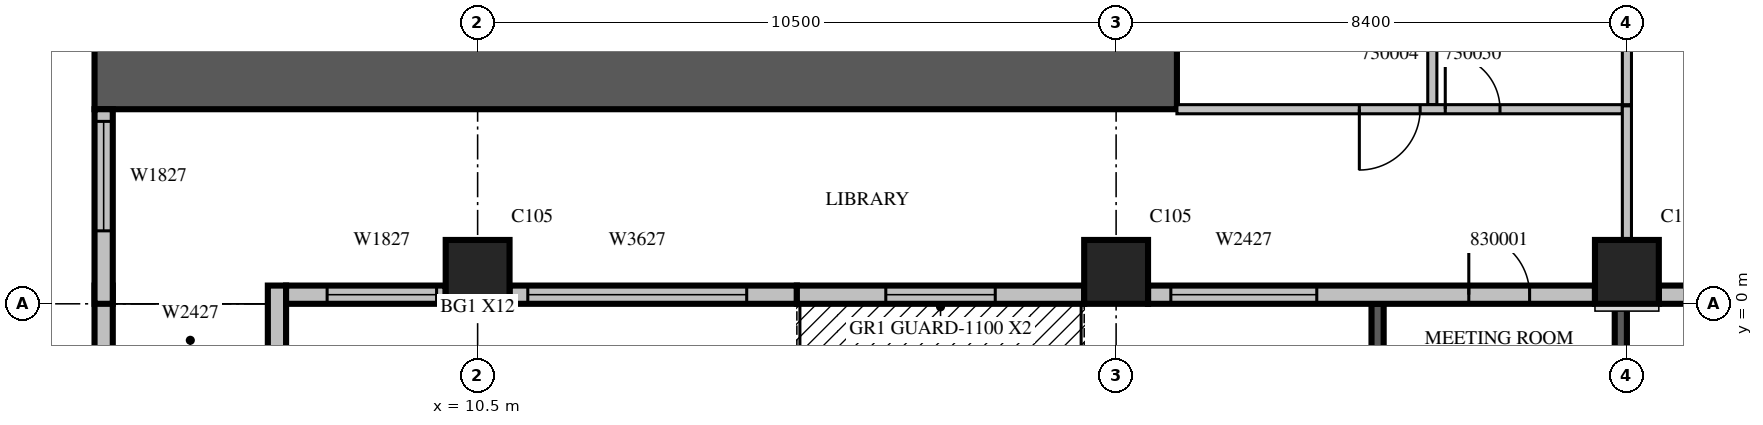
"""IFC4 building model, lengths in metres.
Left out: names, types, materials, properties, quantities, classifications, styles, units other than length and angle.
Written with IfcOpenShell. Run it as: python <this file> out.ifc"""

import sys

from ifc_helpers import new_model, si_unit, direction, frame, frame_2d, origin, origin_2d, place, context, subcontext, project, spatial, rectangle, extrude, source, transform, mapped, element, fill, save


model = new_model("IFC4")
c1 = context("Model", 3, precision=1e-05, world=origin(), true_north=direction((0.0, 1.0)))
c2 = subcontext(c1, "Body", "Model", "MODEL_VIEW")
j1 = project(units=[si_unit("LENGTHUNIT", "METRE"), si_unit("PLANEANGLEUNIT", "RADIAN")], contexts=[c1])
p1 = place(None, origin())
s1 = spatial("IfcSite", under=j1, at=p1, CompositionType="ELEMENT")
p2 = place(p1, origin())
s2 = spatial("IfcBuilding", under=s1, at=p2, CompositionType="ELEMENT")
p3 = place(p2, frame((0.0, 0.0, 137.1)))
s3 = spatial("IfcBuildingStorey", under=s2, at=p3, CompositionType="ELEMENT", Elevation=137.1)
m1 = source(origin(), c2, "Body", "SweptSolid", [
    extrude(rectangle(XDim=1.05, YDim=1.05, at=origin_2d()), origin(), (0.0, 0.0, 1.0), 4.2),
])
for number, where, z_axis, x_axis in (
    (1, (10.5, 0.525, 0.0), (0.0, 0.0, 1.0), (1.0, 0.0, 0.0)),
    (2, (21.0, 0.525, 0.0), (0.0, 0.0, 1.0), (1.0, 0.0, 0.0)),
    (3, (29.4, 0.525, 0.0), (0.0, 0.0, 1.0), (1.0, 0.0, 0.0)),
):
    element("IfcColumn", number, at=place(p3, frame(where, z_axis=z_axis, x_axis=x_axis)), inside=s3, PredefinedType="COLUMN", context=c2, shape_type="MappedRepresentation", body=[
        mapped(m1, transform((0.0, 0.0, 0.0), scale=1.0)),
    ])
m2 = source(origin(), c2, "Body", "SweptSolid", [
    extrude(rectangle(XDim=17.8, YDim=1.0, at=frame_2d((8.9, 0.0))), origin(), (0.0, 0.0, 1.0), 4.2),
])
p4 = place(p3, frame((4.2, 3.7, 0.0), z_axis=(0.0, 0.0, 1.0), x_axis=(1.0, 0.0, 0.0)))
e4 = element("IfcWall", 4, at=p4, inside=s3, PredefinedType="SHEAR", context=c2, shape_type="MappedRepresentation", body=[
    mapped(m2, transform((0.0, 0.0, 0.0), scale=1.0)),
])
m3 = source(origin(), c2, "Body", "SweptSolid", [
    extrude(rectangle(XDim=3.9, YDim=0.2, at=frame_2d((1.95, 0.0))), origin(), (0.0, 0.0, 1.0), 3.8),
])
p5 = place(p3, frame((25.3, 0.0, 0.0), z_axis=(0.0, 0.0, 1.0), x_axis=(0.0, -1.0, 0.0)))
e5 = element("IfcWall", 5, at=p5, inside=s3, PredefinedType="SOLIDWALL", context=c2, shape_type="MappedRepresentation", body=[
    mapped(m3, transform((0.0, 0.0, 0.0), scale=1.0)),
])
m4 = source(origin(), c2, "Body", "SweptSolid", [
    extrude(rectangle(XDim=2.4, YDim=2.7, at=frame_2d((1.2, 1.35))), frame((0.0, 0.11, 0.0), z_axis=(0.0, -1.0, 0.0), x_axis=(1.0, 0.0, 0.0)), (0.0, 0.0, 1.0), 0.22),
])
p6 = place(p5, frame((0.75, 0.0, 0.6)))
e6 = element("IfcOpeningElement", 6, at=p6, cuts=e5, PredefinedType="OPENING", context=c2, shape_type="MappedRepresentation", body=[
    mapped(m4, transform((0.0, 0.0, 0.0), scale=1.0)),
])
p7 = place(p3, frame((29.3, 0.0, 0.0), z_axis=(0.0, 0.0, 1.0), x_axis=(0.0, -1.0, 0.0)))
e7 = element("IfcWall", 7, at=p7, inside=s3, PredefinedType="SOLIDWALL", context=c2, shape_type="MappedRepresentation", body=[
    mapped(m3, transform((0.0, 0.0, 0.0), scale=1.0)),
])
p8 = place(p7, frame((0.75, 0.0, 0.6)))
e8 = element("IfcOpeningElement", 8, at=p8, cuts=e7, PredefinedType="OPENING", context=c2, shape_type="MappedRepresentation", body=[
    mapped(m4, transform((0.0, 0.0, 0.0), scale=1.0)),
])
m5 = source(origin(), c2, "Body", "SweptSolid", [
    extrude(rectangle(XDim=1.2, YDim=0.3, at=frame_2d((0.6, 0.0))), origin(), (0.0, 0.0, 1.0), 3.8),
])
for number, where, z_axis, x_axis in (
    (9, (4.35, 0.3, 0.0), (0.0, 0.0, 1.0), (0.0, -1.0, 0.0)),
    (10, (7.2, 0.3, 0.0), (0.0, 0.0, 1.0), (0.0, -1.0, 0.0)),
):
    element("IfcWall", number, at=place(p3, frame(where, z_axis=z_axis, x_axis=x_axis)), inside=s3, PredefinedType="STANDARD", context=c2, shape_type="MappedRepresentation", body=[
        mapped(m5, transform((0.0, 0.0, 0.0), scale=1.0)),
    ])
m6 = source(origin(), c2, "Body", "SweptSolid", [
    extrude(rectangle(XDim=2.625, YDim=0.3, at=frame_2d((1.312, 0.0))), origin(), (0.0, 0.0, 1.0), 3.8),
])
p9 = place(p3, frame((7.35, 0.15, 0.0), z_axis=(0.0, 0.0, 1.0), x_axis=(1.0, 0.0, 0.0)))
e11 = element("IfcWall", 11, at=p9, inside=s3, PredefinedType="STANDARD", context=c2, shape_type="MappedRepresentation", body=[
    mapped(m6, transform((0.0, 0.0, 0.0), scale=1.0)),
])
m7 = source(origin(), c2, "Body", "SweptSolid", [
    extrude(rectangle(XDim=1.8, YDim=2.7, at=frame_2d((0.9, 1.35))), frame((0.0, 0.16, 0.0), z_axis=(0.0, -1.0, 0.0), x_axis=(1.0, 0.0, 0.0)), (0.0, 0.0, 1.0), 0.32),
])
p10 = place(p9, frame((0.675, 0.0, 0.6)))
e12 = element("IfcOpeningElement", 12, at=p10, cuts=e11, PredefinedType="OPENING", context=c2, shape_type="MappedRepresentation", body=[
    mapped(m7, transform((0.0, 0.0, 0.0), scale=1.0)),
])
m8 = source(origin(), c2, "Body", "SweptSolid", [
    extrude(rectangle(XDim=4.725, YDim=0.3, at=frame_2d((2.362, 0.0))), origin(), (0.0, 0.0, 1.0), 3.8),
])
p11 = place(p3, frame((11.025, 0.15, 0.0), z_axis=(0.0, 0.0, 1.0), x_axis=(1.0, 0.0, 0.0)))
e13 = element("IfcWall", 13, at=p11, inside=s3, PredefinedType="STANDARD", context=c2, shape_type="MappedRepresentation", body=[
    mapped(m8, transform((0.0, 0.0, 0.0), scale=1.0)),
])
m9 = source(origin(), c2, "Body", "SweptSolid", [
    extrude(rectangle(XDim=3.6, YDim=2.7, at=frame_2d((1.8, 1.35))), frame((0.0, 0.16, 0.0), z_axis=(0.0, -1.0, 0.0), x_axis=(1.0, 0.0, 0.0)), (0.0, 0.0, 1.0), 0.32),
])
p12 = place(p11, frame((0.3, 0.0, 0.6)))
e14 = element("IfcOpeningElement", 14, at=p12, cuts=e13, PredefinedType="OPENING", context=c2, shape_type="MappedRepresentation", body=[
    mapped(m9, transform((0.0, 0.0, 0.0), scale=1.0)),
])
p13 = place(p3, frame((15.75, 0.15, 0.0), z_axis=(0.0, 0.0, 1.0), x_axis=(1.0, 0.0, 0.0)))
e15 = element("IfcWall", 15, at=p13, inside=s3, PredefinedType="STANDARD", context=c2, shape_type="MappedRepresentation", body=[
    mapped(m8, transform((0.0, 0.0, 0.0), scale=1.0)),
])
m10 = source(origin(), c2, "Body", "SweptSolid", [
    extrude(rectangle(XDim=1.8, YDim=2.4, at=frame_2d((0.9, 1.2))), frame((0.0, 0.16, 0.0), z_axis=(0.0, -1.0, 0.0), x_axis=(1.0, 0.0, 0.0)), (0.0, 0.0, 1.0), 0.32),
])
p14 = place(p13, frame((1.462, 0.0, 0.0)))
e16 = element("IfcOpeningElement", 16, at=p14, cuts=e15, PredefinedType="OPENING", context=c2, shape_type="MappedRepresentation", body=[
    mapped(m10, transform((0.0, 0.0, 0.0), scale=1.0)),
])
m11 = source(origin(), c2, "Body", "SweptSolid", [
    extrude(rectangle(XDim=7.35, YDim=0.3, at=frame_2d((3.675, 0.0))), origin(), (0.0, 0.0, 1.0), 3.8),
])
p15 = place(p3, frame((21.525, 0.15, 0.0), z_axis=(0.0, 0.0, 1.0), x_axis=(1.0, 0.0, 0.0)))
e17 = element("IfcWall", 17, at=p15, inside=s3, PredefinedType="STANDARD", context=c2, shape_type="MappedRepresentation", body=[
    mapped(m11, transform((0.0, 0.0, 0.0), scale=1.0)),
])
m12 = source(origin(), c2, "Body", "SweptSolid", [
    extrude(rectangle(XDim=2.4, YDim=2.7, at=frame_2d((1.2, 1.35))), frame((0.0, 0.16, 0.0), z_axis=(0.0, -1.0, 0.0), x_axis=(1.0, 0.0, 0.0)), (0.0, 0.0, 1.0), 0.32),
])
p16 = place(p15, frame((0.375, 0.0, 0.6)))
e18 = element("IfcOpeningElement", 18, at=p16, cuts=e17, PredefinedType="OPENING", context=c2, shape_type="MappedRepresentation", body=[
    mapped(m12, transform((0.0, 0.0, 0.0), scale=1.0)),
])
m13 = source(origin(), c2, "Body", "SweptSolid", [
    extrude(rectangle(XDim=1.0, YDim=2.1, at=frame_2d((0.5, 1.05))), frame((0.0, 0.16, 0.0), z_axis=(0.0, -1.0, 0.0), x_axis=(1.0, 0.0, 0.0)), (0.0, 0.0, 1.0), 0.32),
])
p17 = place(p15, frame((5.275, 0.0, 0.0)))
e19 = element("IfcOpeningElement", 19, at=p17, cuts=e17, PredefinedType="OPENING", context=c2, shape_type="MappedRepresentation", body=[
    mapped(m13, transform((0.0, 0.0, 0.0), scale=1.0)),
])
p18 = place(p3, frame((29.925, 0.15, 0.0), z_axis=(0.0, 0.0, 1.0), x_axis=(1.0, 0.0, 0.0)))
e20 = element("IfcWall", 20, at=p18, inside=s3, PredefinedType="STANDARD", context=c2, shape_type="MappedRepresentation", body=[
    mapped(m11, transform((0.0, 0.0, 0.0), scale=1.0)),
])
p19 = place(p18, frame((2.575, 0.0, 0.6)))
e21 = element("IfcOpeningElement", 21, at=p19, cuts=e20, PredefinedType="OPENING", context=c2, shape_type="MappedRepresentation", body=[
    mapped(m12, transform((0.0, 0.0, 0.0), scale=1.0)),
])
m14 = source(origin(), c2, "Body", "SweptSolid", [
    extrude(rectangle(XDim=3.2, YDim=0.3, at=frame_2d((1.6, 0.0))), origin(), (0.0, 0.0, 1.0), 3.8),
])
p20 = place(p3, frame((4.35, 3.2, 0.0), z_axis=(0.0, 0.0, 1.0), x_axis=(0.0, -1.0, 0.0)))
e22 = element("IfcWall", 22, at=p20, inside=s3, PredefinedType="STANDARD", context=c2, shape_type="MappedRepresentation", body=[
    mapped(m14, transform((0.0, 0.0, 0.0), scale=1.0)),
])
p21 = place(p20, frame((0.2, 0.0, 0.6)))
e23 = element("IfcOpeningElement", 23, at=p21, cuts=e22, PredefinedType="OPENING", context=c2, shape_type="MappedRepresentation", body=[
    mapped(m7, transform((0.0, 0.0, 0.0), scale=1.0)),
])
m15 = source(origin(), c2, "Body", "SweptSolid", [
    extrude(rectangle(XDim=11.425, YDim=0.15, at=frame_2d((5.713, 0.0))), origin(), (0.0, 0.0, 1.0), 3.8),
])
p22 = place(p3, frame((26.2, 14.7, 0.0), z_axis=(0.0, 0.0, 1.0), x_axis=(0.0, -1.0, 0.0)))
e24 = element("IfcWall", 24, at=p22, inside=s3, PredefinedType="PARTITIONING", context=c2, shape_type="MappedRepresentation", body=[
    mapped(m15, transform((0.0, 0.0, 0.0), scale=1.0)),
])
m16 = source(origin(), c2, "Body", "SweptSolid", [
    extrude(rectangle(XDim=0.9, YDim=2.1, at=frame_2d((0.45, 1.05))), frame((0.0, 0.085, 0.0), z_axis=(0.0, -1.0, 0.0), x_axis=(1.0, 0.0, 0.0)), (0.0, 0.0, 1.0), 0.17),
])
p23 = place(p22, frame((7.362, 0.0, 0.0)))
e25 = element("IfcOpeningElement", 25, at=p23, cuts=e24, PredefinedType="OPENING", context=c2, shape_type="MappedRepresentation", body=[
    mapped(m16, transform((0.0, 0.0, 0.0), scale=1.0)),
])
p24 = place(p22, frame((0.775, 0.0, 0.0)))
e26 = element("IfcOpeningElement", 26, at=p24, cuts=e24, PredefinedType="OPENING", context=c2, shape_type="MappedRepresentation", body=[
    mapped(m16, transform((0.0, 0.0, 0.0), scale=1.0)),
])
m17 = source(origin(), c2, "Body", "SweptSolid", [
    extrude(rectangle(XDim=6.701, YDim=0.15, at=frame_2d((3.35, 0.0))), origin(), (0.0, 0.0, 1.0), 3.8),
])
p25 = place(p3, frame((29.4, 3.275, 0.0), z_axis=(0.0, 0.0, 1.0), x_axis=(0.0, 1.0, 0.0)))
e27 = element("IfcWall", 27, at=p25, inside=s3, PredefinedType="PARTITIONING", context=c2, shape_type="MappedRepresentation", body=[
    mapped(m17, transform((0.0, 0.0, 0.0), scale=1.0)),
])
m18 = source(origin(), c2, "Body", "SweptSolid", [
    extrude(rectangle(XDim=7.325, YDim=0.15, at=frame_2d((3.663, 0.0))), origin(), (0.0, 0.0, 1.0), 3.8),
])
p26 = place(p3, frame((22.0, 3.2, 0.0), z_axis=(0.0, 0.0, 1.0), x_axis=(1.0, 0.0, 0.0)))
e28 = element("IfcWall", 28, at=p26, inside=s3, PredefinedType="PARTITIONING", context=c2, shape_type="MappedRepresentation", body=[
    mapped(m18, transform((0.0, 0.0, 0.0), scale=1.0)),
])
m19 = source(origin(), c2, "Body", "SweptSolid", [
    extrude(rectangle(XDim=1.0, YDim=2.1, at=frame_2d((0.5, 1.05))), frame((0.0, 0.085, 0.0), z_axis=(0.0, -1.0, 0.0), x_axis=(1.0, 0.0, 0.0)), (0.0, 0.0, 1.0), 0.17),
])
p27 = place(p26, frame((3.0, 0.0, 0.0)))
e29 = element("IfcOpeningElement", 29, at=p27, cuts=e28, PredefinedType="OPENING", context=c2, shape_type="MappedRepresentation", body=[
    mapped(m19, transform((0.0, 0.0, 0.0), scale=1.0)),
])
p28 = place(p26, frame((4.413, 0.0, 0.0)))
e30 = element("IfcOpeningElement", 30, at=p28, cuts=e28, PredefinedType="OPENING", context=c2, shape_type="MappedRepresentation", body=[
    mapped(m16, transform((0.0, 0.0, 0.0), scale=1.0)),
])
m20 = source(origin(), c2, "Body", "SweptSolid", [
    extrude(rectangle(XDim=2.206, YDim=0.15, at=frame_2d((1.103, 0.0))), origin(), (0.0, 0.0, 1.0), 3.8),
])
p29 = place(p3, frame((29.4, 1.049, 0.0), z_axis=(0.0, 0.0, 1.0), x_axis=(0.0, 1.0, 0.0)))
e31 = element("IfcWall", 31, at=p29, inside=s3, PredefinedType="PARTITIONING", context=c2, shape_type="MappedRepresentation", body=[
    mapped(m20, transform((0.0, 0.0, 0.0), scale=1.0)),
])
m21 = source(origin(), c2, "Body", "SweptSolid", [
    extrude(rectangle(XDim=1.8, YDim=2.7, at=frame_2d((0.9, 1.35))), frame((0.0, 0.03, 0.0), z_axis=(0.0, -1.0, 0.0), x_axis=(1.0, 0.0, 0.0)), (0.0, 0.0, 1.0), 0.06),
])
p30 = place(p10, origin())
e32 = element("IfcWindow", 32, at=p30, inside=s3, PartitioningType="SINGLE_PANEL", PredefinedType="WINDOW", context=c2, shape_type="MappedRepresentation", body=[
    mapped(m21, transform((0.0, 0.0, 0.0), scale=1.0)),
])
fill(e12, e32)
m22 = source(origin(), c2, "Body", "SweptSolid", [
    extrude(rectangle(XDim=3.6, YDim=2.7, at=frame_2d((1.8, 1.35))), frame((0.0, 0.03, 0.0), z_axis=(0.0, -1.0, 0.0), x_axis=(1.0, 0.0, 0.0)), (0.0, 0.0, 1.0), 0.06),
])
p31 = place(p12, origin())
e33 = element("IfcWindow", 33, at=p31, inside=s3, PartitioningType="SINGLE_PANEL", PredefinedType="WINDOW", context=c2, shape_type="MappedRepresentation", body=[
    mapped(m22, transform((0.0, 0.0, 0.0), scale=1.0)),
])
fill(e14, e33)
m23 = source(origin(), c2, "Body", "SweptSolid", [
    extrude(rectangle(XDim=1.8, YDim=2.4, at=frame_2d((0.9, 1.2))), frame((0.0, 0.025, 0.0), z_axis=(0.0, -1.0, 0.0), x_axis=(1.0, 0.0, 0.0)), (0.0, 0.0, 1.0), 0.05),
])
p32 = place(p14, origin())
e34 = element("IfcDoor", 34, at=p32, inside=s3, OperationType="SLIDING_TO_LEFT", PredefinedType="DOOR", context=c2, shape_type="MappedRepresentation", body=[
    mapped(m23, transform((0.0, 0.0, 0.0), scale=1.0)),
])
fill(e16, e34)
m24 = source(origin(), c2, "Body", "SweptSolid", [
    extrude(rectangle(XDim=2.4, YDim=2.7, at=frame_2d((1.2, 1.35))), frame((0.0, 0.03, 0.0), z_axis=(0.0, -1.0, 0.0), x_axis=(1.0, 0.0, 0.0)), (0.0, 0.0, 1.0), 0.06),
])
p33 = place(p16, origin())
e35 = element("IfcWindow", 35, at=p33, inside=s3, PartitioningType="SINGLE_PANEL", PredefinedType="WINDOW", context=c2, shape_type="MappedRepresentation", body=[
    mapped(m24, transform((0.0, 0.0, 0.0), scale=1.0)),
])
fill(e18, e35)
p34 = place(p21, origin())
e36 = element("IfcWindow", 36, at=p34, inside=s3, PartitioningType="SINGLE_PANEL", PredefinedType="WINDOW", context=c2, shape_type="MappedRepresentation", body=[
    mapped(m21, transform((0.0, 0.0, 0.0), scale=1.0)),
])
fill(e23, e36)
m25 = source(origin(), c2, "Body", "SweptSolid", [
    extrude(rectangle(XDim=1.0, YDim=2.1, at=frame_2d((0.5, 1.05))), frame((0.0, 0.025, 0.0), z_axis=(0.0, -1.0, 0.0), x_axis=(1.0, 0.0, 0.0)), (0.0, 0.0, 1.0), 0.05),
])
p35 = place(p27, origin())
e37 = element("IfcDoor", 37, at=p35, inside=s3, OperationType="SINGLE_SWING_RIGHT", PredefinedType="DOOR", context=c2, shape_type="MappedRepresentation", body=[
    mapped(m25, transform((0.0, 0.0, 0.0), scale=1.0)),
])
fill(e29, e37)
m26 = source(origin(), c2, "Body", "SweptSolid", [
    extrude(rectangle(XDim=0.9, YDim=2.1, at=frame_2d((0.45, 1.05))), frame((0.0, 0.025, 0.0), z_axis=(0.0, -1.0, 0.0), x_axis=(1.0, 0.0, 0.0)), (0.0, 0.0, 1.0), 0.05),
])
p36 = place(p28, origin())
e38 = element("IfcDoor", 38, at=p36, inside=s3, OperationType="SINGLE_SWING_LEFT", PredefinedType="DOOR", context=c2, shape_type="MappedRepresentation", body=[
    mapped(m26, transform((0.0, 0.0, 0.0), scale=1.0)),
])
fill(e30, e38)
p37 = place(p17, origin())
e39 = element("IfcDoor", 39, at=p37, inside=s3, OperationType="SINGLE_SWING_LEFT", PredefinedType="DOOR", context=c2, shape_type="MappedRepresentation", body=[
    mapped(m25, transform((0.0, 0.0, 0.0), scale=1.0)),
])
fill(e19, e39)
save(model, sys.argv[1])
